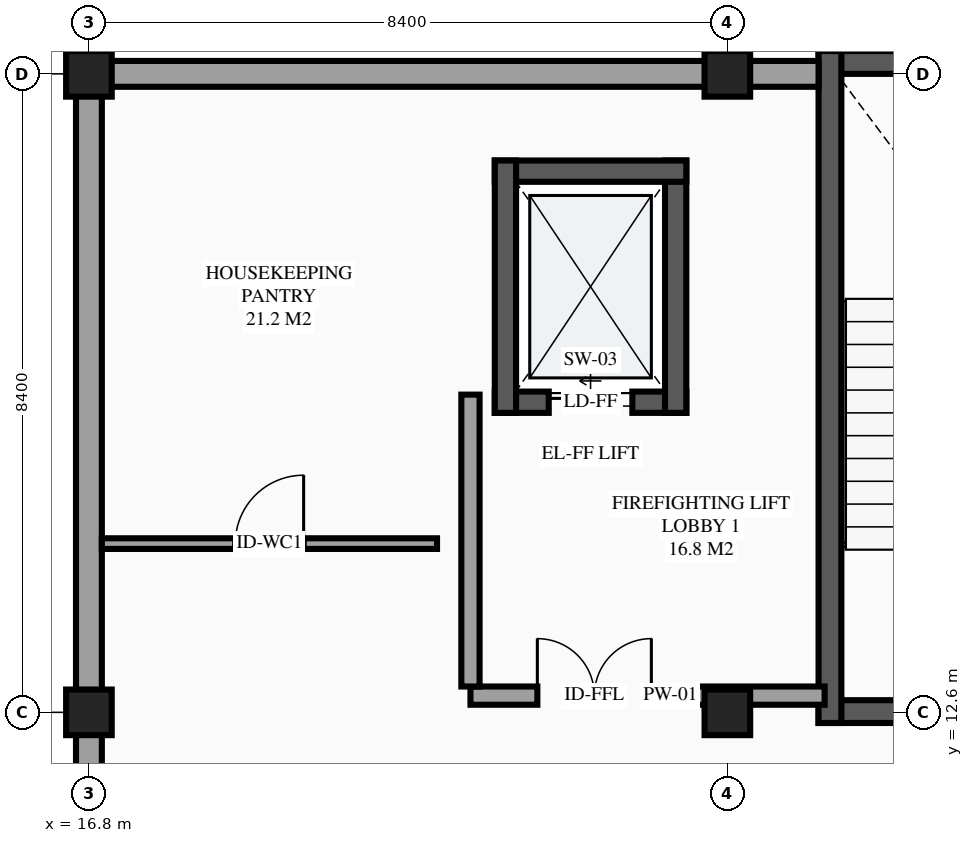
"""IFC4 building model, lengths in metres.
Left out: names, types, materials, properties, quantities, classifications, styles, units other than length and angle.
Written with IfcOpenShell. Run it as: python <this file> out.ifc"""

import sys

from ifc_helpers import new_model, si_unit, direction, frame, frame_2d, origin, origin_2d, place, context, subcontext, project, spatial, rectangle, extrude, element, fill, save


model = new_model("IFC4")
c1 = context("Model", 3, precision=1e-05, world=origin(), true_north=direction((0.0, 1.0)))
c2 = subcontext(c1, "Body", "Model", "MODEL_VIEW")
j1 = project(units=[si_unit("LENGTHUNIT", "METRE"), si_unit("PLANEANGLEUNIT", "RADIAN")], contexts=[c1])
p1 = place(None, origin())
s1 = spatial("IfcSite", under=j1, at=p1, CompositionType="ELEMENT")
p2 = place(p1, origin())
s2 = spatial("IfcBuilding", under=s1, at=p2, CompositionType="ELEMENT")
p3 = place(p2, frame((0.0, 0.0, 29.1)))
s3 = spatial("IfcBuildingStorey", under=s2, at=p3, CompositionType="ELEMENT", Elevation=29.1)
for number, where, z_axis, x_axis in (
    (1, (16.8, 12.6, 0.0), (0.0, 0.0, 1.0), (1.0, 0.0, 0.0)),
    (2, (16.8, 21.0, 0.0), (0.0, 0.0, 1.0), (1.0, 0.0, 0.0)),
    (3, (25.2, 12.6, 0.0), (0.0, 0.0, 1.0), (1.0, 0.0, 0.0)),
    (4, (25.2, 21.0, 0.0), (0.0, 0.0, 1.0), (1.0, 0.0, 0.0)),
):
    element("IfcColumn", number, at=place(p3, frame(where, z_axis=z_axis, x_axis=x_axis)), inside=s3, PredefinedType="COLUMN", context=c2, shape_type="SweptSolid", body=[
        extrude(rectangle(XDim=0.6, YDim=0.6, at=origin_2d()), origin(), (0.0, 0.0, 1.0), 3.6),
    ])
p4 = place(p3, frame((25.2, 21.0, 0.0), z_axis=(0.0, 0.0, 1.0), x_axis=(-1.0, 0.0, 0.0)))
e5 = element("IfcWall", 5, at=p4, inside=s3, PredefinedType="STANDARD", context=c2, shape_type="SweptSolid", body=[
    extrude(rectangle(XDim=8.4, YDim=0.34, at=frame_2d((4.2, 0.0))), origin(), (0.0, 0.0, 1.0), 2.53),
])
p5 = place(p3, frame((16.8, 21.0, 0.0), z_axis=(0.0, 0.0, 1.0), x_axis=(0.0, -1.0, 0.0)))
e6 = element("IfcWall", 6, at=p5, inside=s3, PredefinedType="STANDARD", context=c2, shape_type="SweptSolid", body=[
    extrude(rectangle(XDim=11.0, YDim=0.34, at=frame_2d((5.5, 0.0))), origin(), (0.0, 0.0, 1.0), 2.53),
])
p6 = place(p3, frame((22.14, 16.68, 0.0), z_axis=(0.0, 0.0, 1.0), x_axis=(1.0, 0.0, 0.0)))
e7 = element("IfcWall", 7, at=p6, inside=s3, PredefinedType="SHEAR", context=c2, shape_type="SweptSolid", body=[
    extrude(rectangle(XDim=2.52, YDim=0.28, at=frame_2d((1.26, 0.0))), origin(), (0.0, 0.0, 1.0), 3.6),
])
p7 = place(p6, frame((0.71, 0.0, 0.0)))
e8 = element("IfcOpeningElement", 8, at=p7, cuts=e7, PredefinedType="OPENING", context=c2, shape_type="SweptSolid", body=[
    extrude(rectangle(XDim=1.1, YDim=2.2, at=frame_2d((0.55, 1.1))), frame((0.0, 0.15, 0.0), z_axis=(0.0, -1.0, 0.0), x_axis=(1.0, 0.0, 0.0)), (0.0, 0.0, 1.0), 0.3),
])
p8 = place(p3, frame((24.52, 16.54, 0.0), z_axis=(0.0, 0.0, 1.0), x_axis=(0.0, 1.0, 0.0)))
e9 = element("IfcWall", 9, at=p8, inside=s3, PredefinedType="SHEAR", context=c2, shape_type="SweptSolid", body=[
    extrude(rectangle(XDim=3.32, YDim=0.28, at=frame_2d((1.66, 0.0))), origin(), (0.0, 0.0, 1.0), 3.6),
])
p9 = place(p3, frame((24.66, 19.72, 0.0), z_axis=(0.0, 0.0, 1.0), x_axis=(-1.0, 0.0, 0.0)))
e10 = element("IfcWall", 10, at=p9, inside=s3, PredefinedType="SHEAR", context=c2, shape_type="SweptSolid", body=[
    extrude(rectangle(XDim=2.52, YDim=0.28, at=frame_2d((1.26, 0.0))), origin(), (0.0, 0.0, 1.0), 3.6),
])
p10 = place(p3, frame((22.28, 19.86, 0.0), z_axis=(0.0, 0.0, 1.0), x_axis=(0.0, -1.0, 0.0)))
e11 = element("IfcWall", 11, at=p10, inside=s3, PredefinedType="SHEAR", context=c2, shape_type="SweptSolid", body=[
    extrude(rectangle(XDim=3.32, YDim=0.28, at=frame_2d((1.66, 0.0))), origin(), (0.0, 0.0, 1.0), 3.6),
])
p11 = place(p3, frame((26.4, 12.61, 0.0), z_axis=(0.0, 0.0, 1.0), x_axis=(1.0, 0.0, 0.0)))
e12 = element("IfcWall", 12, at=p11, inside=s3, PredefinedType="SHEAR", context=c2, shape_type="SweptSolid", body=[
    extrude(rectangle(XDim=5.2, YDim=0.3, at=frame_2d((2.6, 0.0))), origin(), (0.0, 0.0, 1.0), 3.6),
])
p12 = place(p11, frame((2.025, 0.0, 0.0)))
e13 = element("IfcOpeningElement", 13, at=p12, cuts=e12, PredefinedType="OPENING", context=c2, shape_type="SweptSolid", body=[
    extrude(rectangle(XDim=1.15, YDim=2.15, at=frame_2d((0.575, 1.075))), frame((0.0, 0.16, 0.0), z_axis=(0.0, -1.0, 0.0), x_axis=(1.0, 0.0, 0.0)), (0.0, 0.0, 1.0), 0.32),
])
p13 = place(p3, frame((31.6, 21.15, 0.0), z_axis=(0.0, 0.0, 1.0), x_axis=(-1.0, 0.0, 0.0)))
e14 = element("IfcWall", 14, at=p13, inside=s3, PredefinedType="SHEAR", context=c2, shape_type="SweptSolid", body=[
    extrude(rectangle(XDim=5.2, YDim=0.3, at=frame_2d((2.6, 0.0))), origin(), (0.0, 0.0, 1.0), 3.6),
])
p14 = place(p3, frame((26.55, 21.3, 0.0), z_axis=(0.0, 0.0, 1.0), x_axis=(0.0, -1.0, 0.0)))
e15 = element("IfcWall", 15, at=p14, inside=s3, PredefinedType="SHEAR", context=c2, shape_type="SweptSolid", body=[
    extrude(rectangle(XDim=8.84, YDim=0.3, at=frame_2d((4.42, 0.0))), origin(), (0.0, 0.0, 1.0), 3.6),
])
p15 = place(p3, frame((21.82, 12.82, 0.0), z_axis=(0.0, 0.0, 1.0), x_axis=(1.0, 0.0, 0.0)))
e16 = element("IfcWall", 16, at=p15, inside=s3, PredefinedType="PARTITIONING", context=c2, shape_type="SweptSolid", body=[
    extrude(rectangle(XDim=4.66, YDim=0.24, at=frame_2d((2.33, 0.0))), origin(), (0.0, 0.0, 1.0), 3.375),
])
p16 = place(p15, frame((0.88, 0.0, 0.0)))
e17 = element("IfcOpeningElement", 17, at=p16, cuts=e16, PredefinedType="OPENING", context=c2, shape_type="SweptSolid", body=[
    extrude(rectangle(XDim=1.5, YDim=2.15, at=frame_2d((0.75, 1.075))), frame((0.0, 0.13, 0.0), z_axis=(0.0, -1.0, 0.0), x_axis=(1.0, 0.0, 0.0)), (0.0, 0.0, 1.0), 0.26),
])
p17 = place(p3, frame((21.82, 12.94, 0.0), z_axis=(0.0, 0.0, 1.0), x_axis=(0.0, 1.0, 0.0)))
e18 = element("IfcWall", 18, at=p17, inside=s3, PredefinedType="PARTITIONING", context=c2, shape_type="SweptSolid", body=[
    extrude(rectangle(XDim=3.84, YDim=0.24, at=frame_2d((1.92, 0.0))), origin(), (0.0, 0.0, 1.0), 3.375),
])
p18 = place(p3, frame((16.97, 14.82, 0.0), z_axis=(0.0, 0.0, 1.0), x_axis=(1.0, 0.0, 0.0)))
e19 = element("IfcWall", 19, at=p18, inside=s3, PredefinedType="PARTITIONING", context=c2, shape_type="SweptSolid", body=[
    extrude(rectangle(XDim=4.41, YDim=0.14, at=frame_2d((2.205, 0.0))), origin(), (0.0, 0.0, 1.0), 3.375),
])
p19 = place(p18, frame((1.755, 0.0, 0.0)))
e20 = element("IfcOpeningElement", 20, at=p19, cuts=e19, PredefinedType="OPENING", context=c2, shape_type="SweptSolid", body=[
    extrude(rectangle(XDim=0.9, YDim=2.12, at=frame_2d((0.45, 1.06))), frame((0.0, 0.08, 0.0), z_axis=(0.0, -1.0, 0.0), x_axis=(1.0, 0.0, 0.0)), (0.0, 0.0, 1.0), 0.16),
])
p20 = place(p3, frame((26.4, 21.0, 0.0), z_axis=(0.0, 0.0, 1.0), x_axis=(-1.0, 0.0, 0.0)))
e21 = element("IfcWall", 21, at=p20, inside=s3, PredefinedType="STANDARD", context=c2, shape_type="SweptSolid", body=[
    extrude(rectangle(XDim=1.2, YDim=0.34, at=frame_2d((0.6, 0.0))), origin(), (0.0, 0.0, 1.0), 2.88),
])
p21 = place(p7, origin())
e22 = element("IfcDoor", 22, at=p21, inside=s3, OperationType="SLIDING_TO_LEFT", PredefinedType="DOOR", context=c2, shape_type="SweptSolid", body=[
    extrude(rectangle(XDim=1.1, YDim=2.2, at=frame_2d((0.55, 1.1))), frame((0.0, 0.025, 0.0), z_axis=(0.0, -1.0, 0.0), x_axis=(1.0, 0.0, 0.0)), (0.0, 0.0, 1.0), 0.05),
])
fill(e8, e22)
p22 = place(p16, origin())
e23 = element("IfcDoor", 23, at=p22, inside=s3, OperationType="DOUBLE_DOOR_SINGLE_SWING", PredefinedType="DOOR", context=c2, shape_type="SweptSolid", body=[
    extrude(rectangle(XDim=1.5, YDim=2.15, at=frame_2d((0.75, 1.075))), frame((0.0, 0.025, 0.0), z_axis=(0.0, -1.0, 0.0), x_axis=(1.0, 0.0, 0.0)), (0.0, 0.0, 1.0), 0.05),
])
fill(e17, e23)
p23 = place(p19, origin())
e24 = element("IfcDoor", 24, at=p23, inside=s3, OperationType="SINGLE_SWING_RIGHT", PredefinedType="DOOR", context=c2, shape_type="SweptSolid", body=[
    extrude(rectangle(XDim=0.9, YDim=2.12, at=frame_2d((0.45, 1.06))), frame((0.0, 0.025, 0.0), z_axis=(0.0, -1.0, 0.0), x_axis=(1.0, 0.0, 0.0)), (0.0, 0.0, 1.0), 0.05),
])
fill(e20, e24)
save(model, sys.argv[1])
